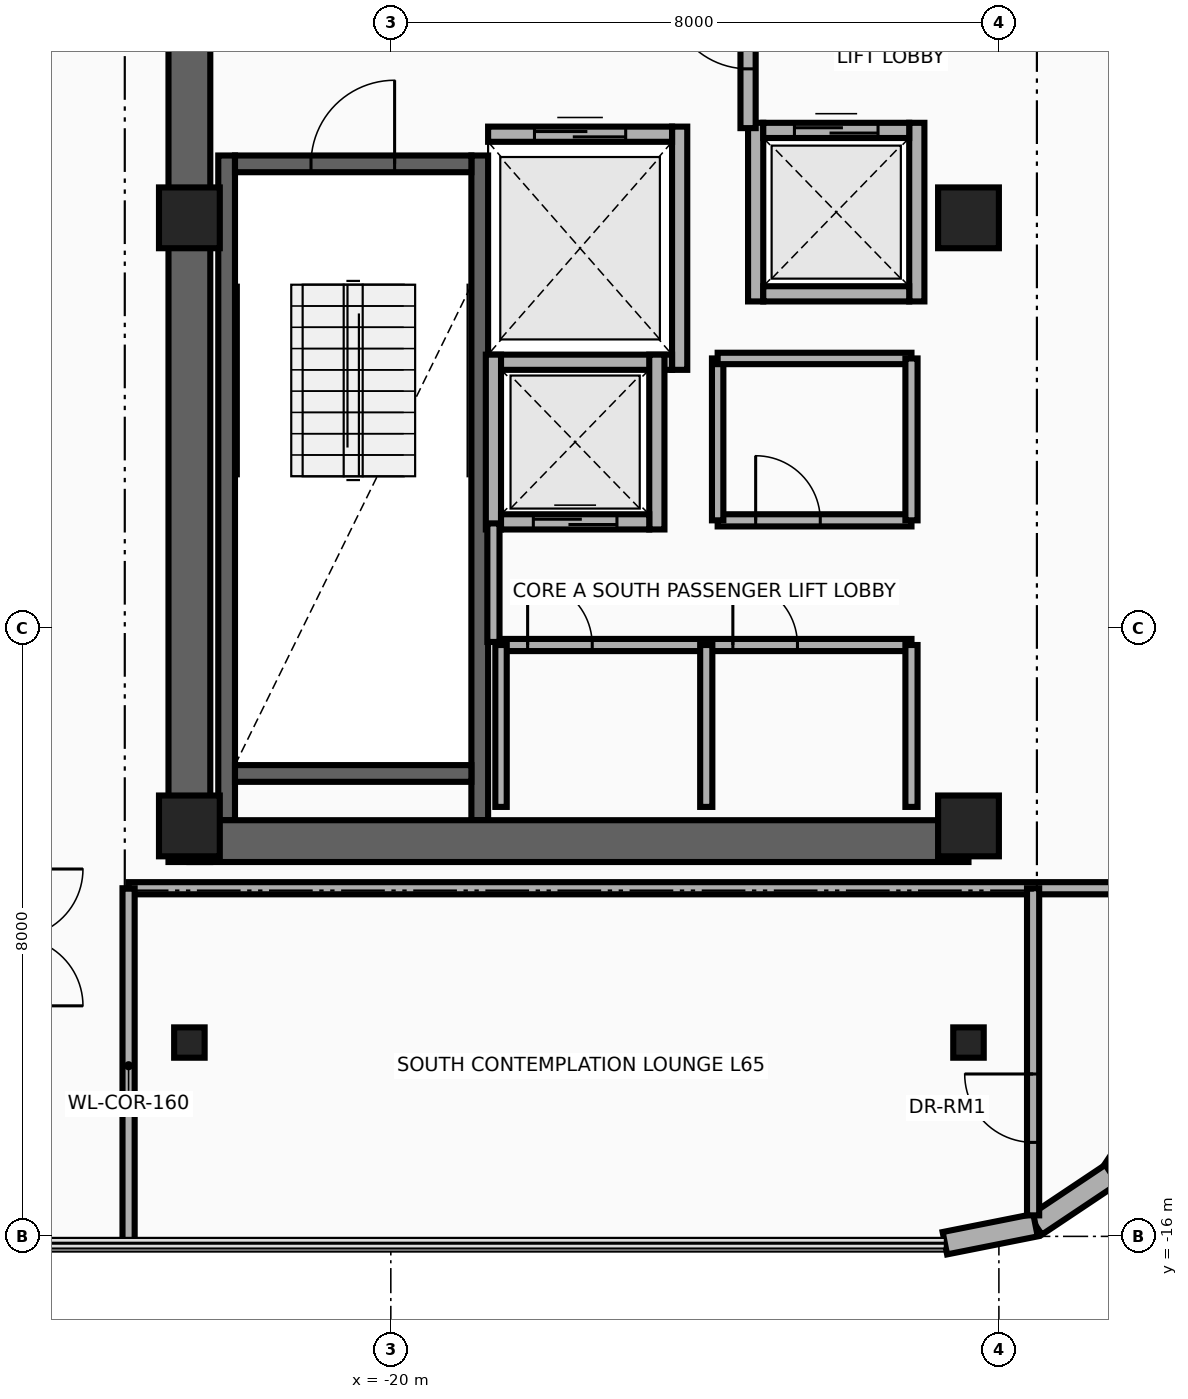
"""IFC4 building model, lengths in metres.
Left out: names, types, materials, properties, quantities, classifications, styles, units other than length and angle.
Written with IfcOpenShell. Run it as: python <this file> out.ifc"""

import sys

from ifc_helpers import new_model, si_unit, direction, frame, frame_2d, origin, origin_2d, place, context, subcontext, project, spatial, rectangle, i_section, extrude, source, transform, mapped, element, fill, save


model = new_model("IFC4")
c1 = context("Model", 3, precision=1e-05, world=origin(), true_north=direction((0.0, 1.0)))
c2 = subcontext(c1, "Body", "Model", "MODEL_VIEW")
j1 = project(units=[si_unit("LENGTHUNIT", "METRE"), si_unit("PLANEANGLEUNIT", "RADIAN")], contexts=[c1])
p1 = place(None, origin())
s1 = spatial("IfcSite", under=j1, at=p1, CompositionType="ELEMENT")
p2 = place(p1, origin())
s2 = spatial("IfcBuilding", under=s1, at=p2, CompositionType="ELEMENT")
p3 = place(p2, frame((0.0, 0.0, 251.0)))
s3 = spatial("IfcBuildingStorey", under=s2, at=p3, CompositionType="ELEMENT", Elevation=251.0)
for number, where, z_axis, x_axis in (
    (1, (-22.16, -10.525, 0.0), (0.0, 0.0, 1.0), (0.0, 1.0, 0.0)),
    (2, (-18.83, -10.525, 0.0), (0.0, 0.0, 1.0), (0.0, 1.0, 0.0)),
):
    element("IfcWall", number, at=place(p3, frame(where, z_axis=z_axis, x_axis=x_axis)), inside=s3, PredefinedType="SHEAR", context=c2, shape_type="SweptSolid", body=[
        extrude(rectangle(XDim=8.745, YDim=0.22, at=frame_2d((4.373, 0.0))), origin(), (0.0, 0.0, 1.0), 3.26),
    ])
p4 = place(p3, frame((-22.05, -9.91, 0.0), z_axis=(0.0, 0.0, 1.0), x_axis=(1.0, 0.0, 0.0)))
e3 = element("IfcWall", 3, at=p4, inside=s3, PredefinedType="SHEAR", context=c2, shape_type="SweptSolid", body=[
    extrude(rectangle(XDim=3.11, YDim=0.22, at=frame_2d((1.555, 0.0))), origin(), (0.0, 0.0, 1.0), 3.26),
])
p5 = place(p3, frame((-22.05, -1.89, 0.0), z_axis=(0.0, 0.0, 1.0), x_axis=(1.0, 0.0, 0.0)))
e4 = element("IfcWall", 4, at=p5, inside=s3, PredefinedType="SHEAR", context=c2, shape_type="SweptSolid", body=[
    extrude(rectangle(XDim=3.11, YDim=0.22, at=frame_2d((1.555, 0.0))), origin(), (0.0, 0.0, 1.0), 3.26),
])
p6 = place(p5, frame((1.0, 0.0, 0.0)))
e5 = element("IfcOpeningElement", 5, at=p6, cuts=e4, PredefinedType="OPENING", context=c2, shape_type="SweptSolid", body=[
    extrude(rectangle(XDim=1.1, YDim=2.15, at=frame_2d((0.55, 1.075))), frame((0.0, 0.125, 0.0), z_axis=(0.0, -1.0, 0.0), x_axis=(1.0, 0.0, 0.0)), (0.0, 0.0, 1.0), 0.25),
])
p7 = place(p3, frame((-22.65, -11.075, 0.0), z_axis=(0.0, 0.0, 1.0), x_axis=(0.0, 1.0, 0.0)))
e6 = element("IfcWall", 6, at=p7, inside=s3, PredefinedType="SHEAR", context=c2, shape_type="SweptSolid", body=[
    extrude(rectangle(XDim=22.15, YDim=0.55, at=frame_2d((11.075, 0.0))), origin(), (0.0, 0.0, 1.0), 3.26),
])
p8 = place(p3, frame((-22.65, -10.8, 0.0), z_axis=(0.0, 0.0, 1.0), x_axis=(1.0, 0.0, 0.0)))
e7 = element("IfcWall", 7, at=p8, inside=s3, PredefinedType="SHEAR", context=c2, shape_type="SweptSolid", body=[
    extrude(rectangle(XDim=10.25, YDim=0.55, at=frame_2d((5.125, 0.0))), origin(), (0.0, 0.0, 1.0), 3.26),
])
m1 = source(origin(), c2, "Body", "SweptSolid", [
    extrude(rectangle(XDim=0.8, YDim=0.8, at=origin_2d()), origin(), (0.0, 0.0, 1.0), 3.5),
])
for number, where, z_axis, x_axis in (
    (8, (-22.65, -10.6, 0.0), (0.0, 0.0, 1.0), (1.0, 0.0, 0.0)),
    (9, (-12.4, -10.6, 0.0), (0.0, 0.0, 1.0), (1.0, 0.0, 0.0)),
    (10, (-22.65, -2.6, 0.0), (0.0, 0.0, 1.0), (1.0, 0.0, 0.0)),
    (11, (-12.4, -2.6, 0.0), (0.0, 0.0, 1.0), (1.0, 0.0, 0.0)),
):
    element("IfcColumn", number, at=place(p3, frame(where, z_axis=z_axis, x_axis=x_axis)), inside=s3, PredefinedType="COLUMN", context=c2, shape_type="MappedRepresentation", body=[
        mapped(m1, transform((0.0, 0.0, 0.0), x_axis=(1.0, 0.0, 0.0), y_axis=(0.0, 1.0, 0.0), z_axis=(0.0, 0.0, 1.0), scale=1.0)),
    ])
m2 = source(origin(), c2, "Body", "SweptSolid", [
    extrude(i_section(OverallWidth=0.401, OverallDepth=0.399, WebThickness=0.025, FlangeThickness=0.04, at=origin_2d()), origin(), (0.0, 0.0, 1.0), 3.5),
])
for number, where, z_axis, x_axis in (
    (12, (-22.65, -13.45, 0.0), (0.0, 0.0, 1.0), (1.0, 0.0, 0.0)),
    (13, (-12.4, -13.45, 0.0), (0.0, 0.0, 1.0), (1.0, 0.0, 0.0)),
):
    element("IfcColumn", number, at=place(p3, frame(where, z_axis=z_axis, x_axis=x_axis)), inside=s3, PredefinedType="COLUMN", context=c2, shape_type="MappedRepresentation", body=[
        mapped(m2, transform((0.0, 0.0, 0.0), x_axis=(1.0, 0.0, 0.0), y_axis=(0.0, 1.0, 0.0), z_axis=(0.0, 0.0, 1.0), scale=1.0)),
    ])
for number, where, z_axis, x_axis in (
    (14, (-9.847, -14.182, 0.0), (0.0, 0.0, 1.0), (-0.556, -0.831, 0.0)),
    (15, (-10.517, -15.183, 0.0), (0.0, 0.0, 1.0), (-0.831, -0.556, 0.0)),
):
    element("IfcWall", number, at=place(p3, frame(where, z_axis=z_axis, x_axis=x_axis)), inside=s3, PredefinedType="SOLIDWALL", context=c2, shape_type="SweptSolid", body=[
        extrude(rectangle(XDim=1.205, YDim=0.3, at=frame_2d((0.603, 0.0))), origin(), (0.0, 0.0, 1.0), 3.26),
    ])
p9 = place(p3, frame((-11.518, -15.853, 0.0), z_axis=(0.0, 0.0, 1.0), x_axis=(-0.980765602568, -0.195189223115, 0.0)))
e16 = element("IfcWall", 16, at=p9, inside=s3, PredefinedType="SOLIDWALL", context=c2, shape_type="SweptSolid", body=[
    extrude(rectangle(XDim=1.216, YDim=0.3, at=frame_2d((0.608, 0.0))), origin(), (0.0, 0.0, 1.0), 3.26),
])
p10 = place(p3, frame((-16.2, -4.6, 0.0), z_axis=(0.0, 0.0, 1.0), x_axis=(0.0, 1.0, 0.0)))
e17 = element("IfcWall", 17, at=p10, inside=s3, PredefinedType="MOVABLE", context=c2, shape_type="SweptSolid", body=[
    extrude(rectangle(XDim=3.2, YDim=0.2, at=frame_2d((1.6, 0.0))), origin(), (0.0, 0.0, 1.0), 3.26),
])
p11 = place(p3, frame((-18.72, -4.5, 0.0), z_axis=(0.0, 0.0, 1.0), x_axis=(1.0, 0.0, 0.0)))
e18 = element("IfcWall", 18, at=p11, inside=s3, PredefinedType="MOVABLE", context=c2, shape_type="SweptSolid", body=[
    extrude(rectangle(XDim=2.42, YDim=0.2, at=frame_2d((1.21, 0.0))), origin(), (0.0, 0.0, 1.0), 3.26),
])
p12 = place(p3, frame((-18.72, -1.5, 0.0), z_axis=(0.0, 0.0, 1.0), x_axis=(1.0, 0.0, 0.0)))
e19 = element("IfcWall", 19, at=p12, inside=s3, PredefinedType="MOVABLE", context=c2, shape_type="SweptSolid", body=[
    extrude(rectangle(XDim=2.42, YDim=0.2, at=frame_2d((1.21, 0.0))), origin(), (0.0, 0.0, 1.0), 3.26),
])
p13 = place(p12, frame((0.61, 0.0, 0.0)))
e20 = element("IfcOpeningElement", 20, at=p13, cuts=e19, PredefinedType="OPENING", context=c2, shape_type="SweptSolid", body=[
    extrude(rectangle(XDim=1.2, YDim=2.1, at=frame_2d((0.6, 1.05))), frame((0.0, 0.115, 0.0), z_axis=(0.0, -1.0, 0.0), x_axis=(1.0, 0.0, 0.0)), (0.0, 0.0, 1.0), 0.23),
])
for number, where, z_axis, x_axis in (
    (21, (-18.65, -6.7, 0.0), (0.0, 0.0, 1.0), (0.0, 1.0, 0.0)),
    (22, (-16.5, -6.7, 0.0), (0.0, 0.0, 1.0), (0.0, 1.0, 0.0)),
):
    element("IfcWall", number, at=place(p3, frame(where, z_axis=z_axis, x_axis=x_axis)), inside=s3, PredefinedType="MOVABLE", context=c2, shape_type="SweptSolid", body=[
        extrude(rectangle(XDim=2.3, YDim=0.2, at=frame_2d((1.15, 0.0))), origin(), (0.0, 0.0, 1.0), 3.26),
    ])
p14 = place(p3, frame((-18.55, -6.6, 0.0), z_axis=(0.0, 0.0, 1.0), x_axis=(1.0, 0.0, 0.0)))
e23 = element("IfcWall", 23, at=p14, inside=s3, PredefinedType="MOVABLE", context=c2, shape_type="SweptSolid", body=[
    extrude(rectangle(XDim=1.95, YDim=0.2, at=frame_2d((0.975, 0.0))), origin(), (0.0, 0.0, 1.0), 3.26),
])
p15 = place(p14, frame((0.425, 0.0, 0.0)))
e24 = element("IfcOpeningElement", 24, at=p15, cuts=e23, PredefinedType="OPENING", context=c2, shape_type="SweptSolid", body=[
    extrude(rectangle(XDim=1.1, YDim=2.1, at=frame_2d((0.55, 1.05))), frame((0.0, 0.115, 0.0), z_axis=(0.0, -1.0, 0.0), x_axis=(1.0, 0.0, 0.0)), (0.0, 0.0, 1.0), 0.23),
])
for number, where, z_axis, x_axis in (
    (25, (-15.2, -3.7, 0.0), (0.0, 0.0, 1.0), (0.0, 1.0, 0.0)),
    (26, (-13.08, -3.7, 0.0), (0.0, 0.0, 1.0), (0.0, 1.0, 0.0)),
):
    element("IfcWall", number, at=place(p3, frame(where, z_axis=z_axis, x_axis=x_axis)), inside=s3, PredefinedType="MOVABLE", context=c2, shape_type="SweptSolid", body=[
        extrude(rectangle(XDim=2.35, YDim=0.2, at=frame_2d((1.175, 0.0))), origin(), (0.0, 0.0, 1.0), 3.26),
    ])
p16 = place(p3, frame((-15.1, -3.6, 0.0), z_axis=(0.0, 0.0, 1.0), x_axis=(1.0, 0.0, 0.0)))
e27 = element("IfcWall", 27, at=p16, inside=s3, PredefinedType="MOVABLE", context=c2, shape_type="SweptSolid", body=[
    extrude(rectangle(XDim=1.92, YDim=0.2, at=frame_2d((0.96, 0.0))), origin(), (0.0, 0.0, 1.0), 3.26),
])
p17 = place(p3, frame((-15.1, -1.45, 0.0), z_axis=(0.0, 0.0, 1.0), x_axis=(1.0, 0.0, 0.0)))
e28 = element("IfcWall", 28, at=p17, inside=s3, PredefinedType="MOVABLE", context=c2, shape_type="SweptSolid", body=[
    extrude(rectangle(XDim=1.92, YDim=0.2, at=frame_2d((0.96, 0.0))), origin(), (0.0, 0.0, 1.0), 3.26),
])
p18 = place(p17, frame((0.41, 0.0, 0.0)))
e29 = element("IfcOpeningElement", 29, at=p18, cuts=e28, PredefinedType="OPENING", context=c2, shape_type="SweptSolid", body=[
    extrude(rectangle(XDim=1.1, YDim=2.1, at=frame_2d((0.55, 1.05))), frame((0.0, 0.115, 0.0), z_axis=(0.0, -1.0, 0.0), x_axis=(1.0, 0.0, 0.0)), (0.0, 0.0, 1.0), 0.23),
])
p19 = place(p3, frame((-15.3, -1.42, 0.0), z_axis=(0.0, 0.0, 1.0), x_axis=(0.0, 1.0, 0.0)))
e30 = element("IfcWall", 30, at=p19, inside=s3, PredefinedType="PARTITIONING", context=c2, shape_type="SweptSolid", body=[
    extrude(rectangle(XDim=2.67, YDim=0.2, at=frame_2d((1.335, 0.0))), origin(), (0.0, 0.0, 1.0), 3.26),
])
p20 = place(p19, frame((0.78, 0.0, 0.0)))
e31 = element("IfcOpeningElement", 31, at=p20, cuts=e30, PredefinedType="OPENING", context=c2, shape_type="SweptSolid", body=[
    extrude(rectangle(XDim=1.05, YDim=2.15, at=frame_2d((0.525, 1.075))), frame((0.0, 0.115, 0.0), z_axis=(0.0, -1.0, 0.0), x_axis=(1.0, 0.0, 0.0)), (0.0, 0.0, 1.0), 0.23),
])
p21 = place(p3, frame((-18.65, -8.18, 0.0), z_axis=(0.0, 0.0, 1.0), x_axis=(0.0, 1.0, 0.0)))
e32 = element("IfcWall", 32, at=p21, inside=s3, PredefinedType="PARTITIONING", context=c2, shape_type="SweptSolid", body=[
    extrude(rectangle(XDim=1.56, YDim=0.16, at=frame_2d((0.78, 0.0))), origin(), (0.0, 0.0, 1.0), 3.26),
])
p22 = place(p3, frame((-18.55, -8.22, 0.0), z_axis=(0.0, 0.0, 1.0), x_axis=(1.0, 0.0, 0.0)))
e33 = element("IfcWall", 33, at=p22, inside=s3, PredefinedType="PARTITIONING", context=c2, shape_type="SweptSolid", body=[
    extrude(rectangle(XDim=5.4, YDim=0.16, at=frame_2d((2.7, 0.0))), origin(), (0.0, 0.0, 1.0), 3.26),
])
p23 = place(p22, frame((0.35, 0.0, 0.0)))
e34 = element("IfcOpeningElement", 34, at=p23, cuts=e33, PredefinedType="OPENING", context=c2, shape_type="SweptSolid", body=[
    extrude(rectangle(XDim=0.85, YDim=2.05, at=frame_2d((0.425, 1.025))), frame((0.0, 0.095, 0.0), z_axis=(0.0, -1.0, 0.0), x_axis=(1.0, 0.0, 0.0)), (0.0, 0.0, 1.0), 0.19),
])
p24 = place(p22, frame((3.05, 0.0, 0.0)))
e35 = element("IfcOpeningElement", 35, at=p24, cuts=e33, PredefinedType="OPENING", context=c2, shape_type="SweptSolid", body=[
    extrude(rectangle(XDim=0.85, YDim=2.05, at=frame_2d((0.425, 1.025))), frame((0.0, 0.095, 0.0), z_axis=(0.0, -1.0, 0.0), x_axis=(1.0, 0.0, 0.0)), (0.0, 0.0, 1.0), 0.19),
])
p25 = place(p3, frame((-18.55, -10.35, 0.0), z_axis=(0.0, 0.0, 1.0), x_axis=(0.0, 1.0, 0.0)))
e36 = element("IfcWall", 36, at=p25, inside=s3, PredefinedType="PARTITIONING", context=c2, shape_type="SweptSolid", body=[
    extrude(rectangle(XDim=2.13, YDim=0.15, at=frame_2d((1.065, 0.0))), origin(), (0.0, 0.0, 1.0), 3.26),
])
for number, where, z_axis, x_axis in (
    (37, (-13.15, -10.35, 0.0), (0.0, 0.0, 1.0), (0.0, 1.0, 0.0)),
    (38, (-15.85, -10.35, 0.0), (0.0, 0.0, 1.0), (0.0, 1.0, 0.0)),
):
    element("IfcWall", number, at=place(p3, frame(where, z_axis=z_axis, x_axis=x_axis)), inside=s3, PredefinedType="PARTITIONING", context=c2, shape_type="SweptSolid", body=[
        extrude(rectangle(XDim=2.13, YDim=0.16, at=frame_2d((1.065, 0.0))), origin(), (0.0, 0.0, 1.0), 3.26),
    ])
p26 = place(p3, frame((-15.7, -6.58, 0.0), z_axis=(0.0, 0.0, 1.0), x_axis=(1.0, 0.0, 0.0)))
e39 = element("IfcWall", 39, at=p26, inside=s3, PredefinedType="PARTITIONING", context=c2, shape_type="SweptSolid", body=[
    extrude(rectangle(XDim=2.55, YDim=0.16, at=frame_2d((1.275, 0.0))), origin(), (0.0, 0.0, 1.0), 3.26),
])
p27 = place(p26, frame((0.5, 0.0, 0.0)))
e40 = element("IfcOpeningElement", 40, at=p27, cuts=e39, PredefinedType="OPENING", context=c2, shape_type="SweptSolid", body=[
    extrude(rectangle(XDim=0.85, YDim=2.05, at=frame_2d((0.425, 1.025))), frame((0.0, 0.095, 0.0), z_axis=(0.0, -1.0, 0.0), x_axis=(1.0, 0.0, 0.0)), (0.0, 0.0, 1.0), 0.19),
])
p28 = place(p3, frame((-15.7, -6.58, 0.0), z_axis=(0.0, 0.0, 1.0), x_axis=(0.0, 1.0, 0.0)))
e41 = element("IfcWall", 41, at=p28, inside=s3, PredefinedType="PARTITIONING", context=c2, shape_type="SweptSolid", body=[
    extrude(rectangle(XDim=2.13, YDim=0.15, at=frame_2d((1.065, 0.0))), origin(), (0.0, 0.0, 1.0), 3.26),
])
p29 = place(p3, frame((-15.7, -4.45, 0.0), z_axis=(0.0, 0.0, 1.0), x_axis=(1.0, 0.0, 0.0)))
e42 = element("IfcWall", 42, at=p29, inside=s3, PredefinedType="PARTITIONING", context=c2, shape_type="SweptSolid", body=[
    extrude(rectangle(XDim=2.55, YDim=0.15, at=frame_2d((1.275, 0.0))), origin(), (0.0, 0.0, 1.0), 3.26),
])
p30 = place(p3, frame((-13.15, -6.58, 0.0), z_axis=(0.0, 0.0, 1.0), x_axis=(0.0, 1.0, 0.0)))
e43 = element("IfcWall", 43, at=p30, inside=s3, PredefinedType="PARTITIONING", context=c2, shape_type="SweptSolid", body=[
    extrude(rectangle(XDim=2.13, YDim=0.16, at=frame_2d((1.065, 0.0))), origin(), (0.0, 0.0, 1.0), 3.26),
])
p31 = place(p3, frame((-23.45, -11.42, 0.0), z_axis=(0.0, 0.0, 1.0), x_axis=(1.0, 0.0, 0.0)))
e44 = element("IfcWall", 44, at=p31, inside=s3, PredefinedType="PARTITIONING", context=c2, shape_type="SweptSolid", body=[
    extrude(rectangle(XDim=13.84, YDim=0.16, at=frame_2d((6.92, 0.0))), origin(), (0.0, 0.0, 1.0), 2.634),
])
p32 = place(p3, frame((-23.45, -16.09, 0.0), z_axis=(0.0, 0.0, 1.0), x_axis=(0.0, 1.0, 0.0)))
e45 = element("IfcWall", 45, at=p32, inside=s3, PredefinedType="PARTITIONING", context=c2, shape_type="SweptSolid", body=[
    extrude(rectangle(XDim=4.67, YDim=0.16, at=frame_2d((2.335, 0.0))), origin(), (0.0, 0.0, 1.0), 3.26),
])
p33 = place(p3, frame((-11.55, -15.724, 0.0), z_axis=(0.0, 0.0, 1.0), x_axis=(0.0, 1.0, 0.0)))
e46 = element("IfcWall", 46, at=p33, inside=s3, PredefinedType="PARTITIONING", context=c2, shape_type="SweptSolid", body=[
    extrude(rectangle(XDim=4.304, YDim=0.16, at=frame_2d((2.152, 0.0))), origin(), (0.0, 0.0, 1.0), 3.26),
])
p34 = place(p33, frame((0.96, 0.0, 0.0)))
e47 = element("IfcOpeningElement", 47, at=p34, cuts=e46, PredefinedType="OPENING", context=c2, shape_type="SweptSolid", body=[
    extrude(rectangle(XDim=0.9, YDim=2.1, at=frame_2d((0.45, 1.05))), frame((0.0, 0.095, 0.0), z_axis=(0.0, -1.0, 0.0), x_axis=(1.0, 0.0, 0.0)), (0.0, 0.0, 1.0), 0.19),
])
p35 = place(p13, origin())
e48 = element("IfcDoor", 48, at=p35, inside=s3, OperationType="DOUBLE_DOOR_SLIDING", PredefinedType="DOOR", context=c2, shape_type="SweptSolid", body=[
    extrude(rectangle(XDim=1.2, YDim=2.1, at=frame_2d((0.6, 1.05))), frame((0.0, 0.025, 0.0), z_axis=(0.0, -1.0, 0.0), x_axis=(1.0, 0.0, 0.0)), (0.0, 0.0, 1.0), 0.05),
])
fill(e20, e48)
p36 = place(p15, origin())
e49 = element("IfcDoor", 49, at=p36, inside=s3, OperationType="DOUBLE_DOOR_SLIDING", PredefinedType="DOOR", context=c2, shape_type="SweptSolid", body=[
    extrude(rectangle(XDim=1.1, YDim=2.1, at=frame_2d((0.55, 1.05))), frame((0.0, 0.025, 0.0), z_axis=(0.0, -1.0, 0.0), x_axis=(1.0, 0.0, 0.0)), (0.0, 0.0, 1.0), 0.05),
])
fill(e24, e49)
p37 = place(p18, origin())
e50 = element("IfcDoor", 50, at=p37, inside=s3, OperationType="DOUBLE_DOOR_SLIDING", PredefinedType="DOOR", context=c2, shape_type="SweptSolid", body=[
    extrude(rectangle(XDim=1.1, YDim=2.1, at=frame_2d((0.55, 1.05))), frame((0.0, 0.025, 0.0), z_axis=(0.0, -1.0, 0.0), x_axis=(1.0, 0.0, 0.0)), (0.0, 0.0, 1.0), 0.05),
])
fill(e29, e50)
p38 = place(p20, origin())
e51 = element("IfcDoor", 51, at=p38, inside=s3, OperationType="SINGLE_SWING_RIGHT", PredefinedType="DOOR", context=c2, shape_type="SweptSolid", body=[
    extrude(rectangle(XDim=1.05, YDim=2.15, at=frame_2d((0.525, 1.075))), frame((0.0, 0.025, 0.0), z_axis=(0.0, -1.0, 0.0), x_axis=(1.0, 0.0, 0.0)), (0.0, 0.0, 1.0), 0.05),
])
fill(e31, e51)
p39 = place(p6, origin())
e52 = element("IfcDoor", 52, at=p39, inside=s3, OperationType="SINGLE_SWING_RIGHT", PredefinedType="DOOR", context=c2, shape_type="SweptSolid", body=[
    extrude(rectangle(XDim=1.1, YDim=2.15, at=frame_2d((0.55, 1.075))), frame((0.0, 0.025, 0.0), z_axis=(0.0, -1.0, 0.0), x_axis=(1.0, 0.0, 0.0)), (0.0, 0.0, 1.0), 0.05),
])
fill(e5, e52)
p40 = place(p23, origin())
e53 = element("IfcDoor", 53, at=p40, inside=s3, OperationType="SINGLE_SWING_RIGHT", PredefinedType="DOOR", context=c2, shape_type="SweptSolid", body=[
    extrude(rectangle(XDim=0.85, YDim=2.05, at=frame_2d((0.425, 1.025))), frame((0.0, 0.025, 0.0), z_axis=(0.0, -1.0, 0.0), x_axis=(1.0, 0.0, 0.0)), (0.0, 0.0, 1.0), 0.05),
])
fill(e34, e53)
p41 = place(p24, origin())
e54 = element("IfcDoor", 54, at=p41, inside=s3, OperationType="SINGLE_SWING_LEFT", PredefinedType="DOOR", context=c2, shape_type="SweptSolid", body=[
    extrude(rectangle(XDim=0.85, YDim=2.05, at=frame_2d((0.425, 1.025))), frame((0.0, 0.025, 0.0), z_axis=(0.0, -1.0, 0.0), x_axis=(1.0, 0.0, 0.0)), (0.0, 0.0, 1.0), 0.05),
])
fill(e35, e54)
p42 = place(p27, origin())
e55 = element("IfcDoor", 55, at=p42, inside=s3, OperationType="SINGLE_SWING_RIGHT", PredefinedType="DOOR", context=c2, shape_type="SweptSolid", body=[
    extrude(rectangle(XDim=0.85, YDim=2.05, at=frame_2d((0.425, 1.025))), frame((0.0, 0.025, 0.0), z_axis=(0.0, -1.0, 0.0), x_axis=(1.0, 0.0, 0.0)), (0.0, 0.0, 1.0), 0.05),
])
fill(e40, e55)
p43 = place(p34, origin())
e56 = element("IfcDoor", 56, at=p43, inside=s3, OperationType="SINGLE_SWING_RIGHT", PredefinedType="DOOR", context=c2, shape_type="SweptSolid", body=[
    extrude(rectangle(XDim=0.9, YDim=2.1, at=frame_2d((0.45, 1.05))), frame((0.0, 0.025, 0.0), z_axis=(0.0, -1.0, 0.0), x_axis=(1.0, 0.0, 0.0)), (0.0, 0.0, 1.0), 0.05),
])
fill(e47, e56)
save(model, sys.argv[1])
